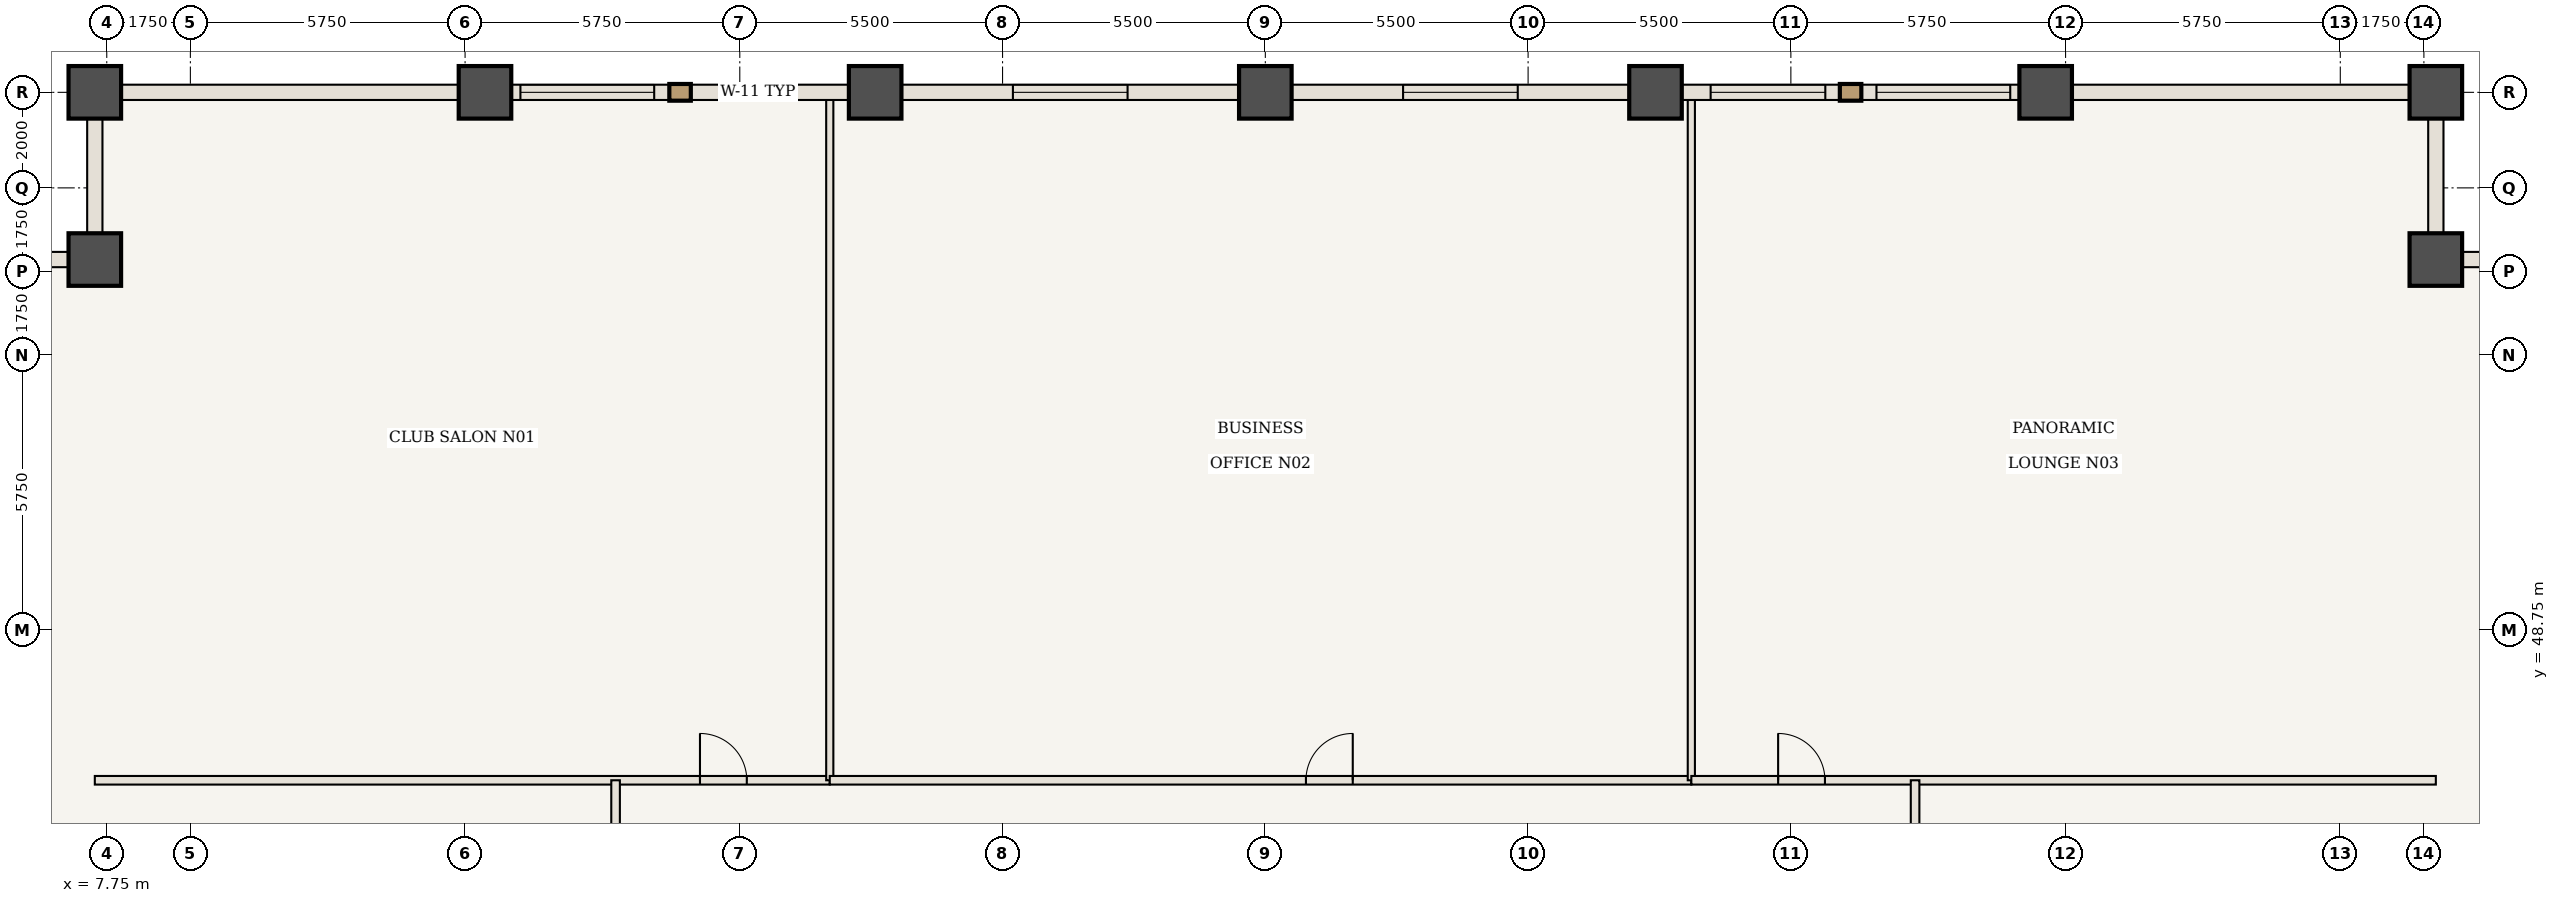
"""IFC4 building model, lengths in metres.
Left out: names, types, materials, properties, quantities, classifications, styles, units other than length and angle.
Written with IfcOpenShell. Run it as: python <this file> out.ifc"""

import sys

from ifc_helpers import new_model, si_unit, direction, frame, frame_2d, origin, origin_2d, place, context, subcontext, project, spatial, rectangle, extrude, element, fill, save


model = new_model("IFC4")
c1 = context("Model", 3, precision=1e-05, world=origin(), true_north=direction((0.0, 1.0)))
c2 = subcontext(c1, "Body", "Model", "MODEL_VIEW")
j1 = project(units=[si_unit("LENGTHUNIT", "METRE"), si_unit("PLANEANGLEUNIT", "RADIAN")], contexts=[c1])
p1 = place(None, origin())
s1 = spatial("IfcSite", under=j1, at=p1, CompositionType="ELEMENT")
p2 = place(p1, origin())
s2 = spatial("IfcBuilding", under=s1, at=p2, CompositionType="ELEMENT")
p3 = place(p2, frame((0.0, 0.0, 96.25)))
s3 = spatial("IfcBuildingStorey", under=s2, at=p3, CompositionType="ELEMENT", Elevation=96.25)
for number, where, z_axis, x_axis in (
    (1, (56.5, 56.5, 0.0), (0.0, 0.0, 1.0), (1.0, 0.0, 0.0)),
    (2, (56.5, 60.0, 0.0), (0.0, 0.0, 1.0), (1.0, 0.0, 0.0)),
    (3, (7.5, 60.0, 0.0), (0.0, 0.0, 1.0), (1.0, 0.0, 0.0)),
    (4, (7.5, 56.5, 0.0), (0.0, 0.0, 1.0), (1.0, 0.0, 0.0)),
    (5, (15.667, 60.0, 0.0), (0.0, 0.0, 1.0), (1.0, 0.0, 0.0)),
    (6, (23.833, 60.0, 0.0), (0.0, 0.0, 1.0), (1.0, 0.0, 0.0)),
    (7, (32.0, 60.0, 0.0), (0.0, 0.0, 1.0), (1.0, 0.0, 0.0)),
    (8, (40.167, 60.0, 0.0), (0.0, 0.0, 1.0), (1.0, 0.0, 0.0)),
    (9, (48.333, 60.0, 0.0), (0.0, 0.0, 1.0), (1.0, 0.0, 0.0)),
):
    element("IfcColumn", number, at=place(p3, frame(where, z_axis=z_axis, x_axis=x_axis)), inside=s3, PredefinedType="COLUMN", context=c2, shape_type="SweptSolid", body=[
        extrude(rectangle(XDim=1.1, YDim=1.1, at=origin_2d()), origin(), (0.0, 0.0, 1.0), 3.5),
    ])
p4 = place(p3, frame((7.5, 45.6, 0.0), z_axis=(0.0, 0.0, 1.0), x_axis=(1.0, 0.0, 0.0)))
e10 = element("IfcWall", 10, at=p4, inside=s3, PredefinedType="STANDARD", context=c2, shape_type="SweptSolid", body=[
    extrude(rectangle(XDim=15.383, YDim=0.18, at=frame_2d((7.692, 0.0))), origin(), (0.0, 0.0, 1.0), 3.08),
])
p5 = place(p4, frame((12.667, 0.0, 0.0)))
e11 = element("IfcOpeningElement", 11, at=p5, cuts=e10, PredefinedType="OPENING", context=c2, shape_type="SweptSolid", body=[
    extrude(rectangle(XDim=0.98, YDim=2.2, at=frame_2d((0.49, 1.1))), frame((0.0, 0.1, 0.0), z_axis=(0.0, -1.0, 0.0), x_axis=(1.0, 0.0, 0.0)), (0.0, 0.0, 1.0), 0.2),
])
p6 = place(p3, frame((22.883, 45.6, 0.0), z_axis=(0.0, 0.0, 1.0), x_axis=(0.0, 1.0, 0.0)))
e12 = element("IfcWall", 12, at=p6, inside=s3, PredefinedType="STANDARD", context=c2, shape_type="SweptSolid", body=[
    extrude(rectangle(XDim=14.34, YDim=0.15, at=frame_2d((7.17, 0.0))), origin(), (0.0, 0.0, 1.0), 3.08),
])
p7 = place(p3, frame((22.883, 45.6, 0.0), z_axis=(0.0, 0.0, 1.0), x_axis=(1.0, 0.0, 0.0)))
e13 = element("IfcWall", 13, at=p7, inside=s3, PredefinedType="STANDARD", context=c2, shape_type="SweptSolid", body=[
    extrude(rectangle(XDim=18.033, YDim=0.18, at=frame_2d((9.017, 0.0))), origin(), (0.0, 0.0, 1.0), 3.08),
])
p8 = place(p7, frame((9.967, 0.0, 0.0)))
e14 = element("IfcOpeningElement", 14, at=p8, cuts=e13, PredefinedType="OPENING", context=c2, shape_type="SweptSolid", body=[
    extrude(rectangle(XDim=0.98, YDim=2.2, at=frame_2d((0.49, 1.1))), frame((0.0, 0.1, 0.0), z_axis=(0.0, -1.0, 0.0), x_axis=(1.0, 0.0, 0.0)), (0.0, 0.0, 1.0), 0.2),
])
p9 = place(p3, frame((40.917, 45.6, 0.0), z_axis=(0.0, 0.0, 1.0), x_axis=(0.0, 1.0, 0.0)))
e15 = element("IfcWall", 15, at=p9, inside=s3, PredefinedType="STANDARD", context=c2, shape_type="SweptSolid", body=[
    extrude(rectangle(XDim=14.34, YDim=0.15, at=frame_2d((7.17, 0.0))), origin(), (0.0, 0.0, 1.0), 3.08),
])
p10 = place(p3, frame((40.917, 45.6, 0.0), z_axis=(0.0, 0.0, 1.0), x_axis=(1.0, 0.0, 0.0)))
e16 = element("IfcWall", 16, at=p10, inside=s3, PredefinedType="STANDARD", context=c2, shape_type="SweptSolid", body=[
    extrude(rectangle(XDim=15.583, YDim=0.18, at=frame_2d((7.792, 0.0))), origin(), (0.0, 0.0, 1.0), 3.08),
])
p11 = place(p10, frame((1.817, 0.0, 0.0)))
e17 = element("IfcOpeningElement", 17, at=p11, cuts=e16, PredefinedType="OPENING", context=c2, shape_type="SweptSolid", body=[
    extrude(rectangle(XDim=0.98, YDim=2.2, at=frame_2d((0.49, 1.1))), frame((0.0, 0.1, 0.0), z_axis=(0.0, -1.0, 0.0), x_axis=(1.0, 0.0, 0.0)), (0.0, 0.0, 1.0), 0.2),
])
p12 = place(p3, frame((18.4, 31.05, 0.0), z_axis=(0.0, 0.0, 1.0), x_axis=(0.0, 1.0, 0.0)))
e18 = element("IfcWall", 18, at=p12, inside=s3, PredefinedType="STANDARD", context=c2, shape_type="SweptSolid", body=[
    extrude(rectangle(XDim=14.55, YDim=0.18, at=frame_2d((7.275, 0.0))), origin(), (0.0, 0.0, 1.0), 3.08),
])
p13 = place(p12, frame((6.775, 0.0, 0.0)))
e19 = element("IfcOpeningElement", 19, at=p13, cuts=e18, PredefinedType="OPENING", context=c2, shape_type="SweptSolid", body=[
    extrude(rectangle(XDim=0.98, YDim=2.2, at=frame_2d((0.49, 1.1))), frame((0.0, 0.1, 0.0), z_axis=(0.0, -1.0, 0.0), x_axis=(1.0, 0.0, 0.0)), (0.0, 0.0, 1.0), 0.2),
])
p14 = place(p3, frame((45.6, 31.05, 0.0), z_axis=(0.0, 0.0, 1.0), x_axis=(0.0, 1.0, 0.0)))
e20 = element("IfcWall", 20, at=p14, inside=s3, PredefinedType="STANDARD", context=c2, shape_type="SweptSolid", body=[
    extrude(rectangle(XDim=14.55, YDim=0.18, at=frame_2d((7.275, 0.0))), origin(), (0.0, 0.0, 1.0), 3.08),
])
p15 = place(p14, frame((6.775, 0.0, 0.0)))
e21 = element("IfcOpeningElement", 21, at=p15, cuts=e20, PredefinedType="OPENING", context=c2, shape_type="SweptSolid", body=[
    extrude(rectangle(XDim=0.98, YDim=2.2, at=frame_2d((0.49, 1.1))), frame((0.0, 0.1, 0.0), z_axis=(0.0, -1.0, 0.0), x_axis=(1.0, 0.0, 0.0)), (0.0, 0.0, 1.0), 0.2),
])
p16 = place(p3, frame((7.5, 60.0, 0.0), z_axis=(0.0, 0.0, 1.0), x_axis=(1.0, 0.0, 0.0)))
e22 = element("IfcWall", 22, at=p16, inside=s3, PredefinedType="USERDEFINED", context=c2, shape_type="SweptSolid", body=[
    extrude(rectangle(XDim=8.167, YDim=0.32, at=frame_2d((4.083, 0.0))), origin(), (0.0, 0.0, 1.0), 2.28),
])
p17 = place(p3, frame((15.667, 60.0, 0.0), z_axis=(0.0, 0.0, 1.0), x_axis=(1.0, 0.0, 0.0)))
e23 = element("IfcWall", 23, at=p17, inside=s3, PredefinedType="USERDEFINED", context=c2, shape_type="SweptSolid", body=[
    extrude(rectangle(XDim=8.167, YDim=0.32, at=frame_2d((4.083, 0.0))), origin(), (0.0, 0.0, 1.0), 2.28),
])
p18 = place(p17, frame((0.742, 0.0, 0.85)))
e24 = element("IfcOpeningElement", 24, at=p18, cuts=e23, PredefinedType="OPENING", context=c2, shape_type="SweptSolid", body=[
    extrude(rectangle(XDim=2.8, YDim=1.23, at=frame_2d((1.4, 0.615))), frame((0.0, 0.17, 0.0), z_axis=(0.0, -1.0, 0.0), x_axis=(1.0, 0.0, 0.0)), (0.0, 0.0, 1.0), 0.34),
])
p19 = place(p17, frame((4.912, 0.0, 0.85)))
e25 = element("IfcOpeningElement", 25, at=p19, cuts=e23, PredefinedType="OPENING", context=c2, shape_type="SweptSolid", body=[
    extrude(rectangle(XDim=1.6, YDim=1.23, at=frame_2d((0.8, 0.615))), frame((0.0, 0.17, 0.0), z_axis=(0.0, -1.0, 0.0), x_axis=(1.0, 0.0, 0.0)), (0.0, 0.0, 1.0), 0.34),
])
p20 = place(p3, frame((23.833, 60.0, 0.0), z_axis=(0.0, 0.0, 1.0), x_axis=(1.0, 0.0, 0.0)))
e26 = element("IfcWall", 26, at=p20, inside=s3, PredefinedType="USERDEFINED", context=c2, shape_type="SweptSolid", body=[
    extrude(rectangle(XDim=8.167, YDim=0.32, at=frame_2d((4.083, 0.0))), origin(), (0.0, 0.0, 1.0), 2.28),
])
p21 = place(p20, frame((2.883, 0.0, 0.85)))
e27 = element("IfcOpeningElement", 27, at=p21, cuts=e26, PredefinedType="OPENING", context=c2, shape_type="SweptSolid", body=[
    extrude(rectangle(XDim=2.4, YDim=1.23, at=frame_2d((1.2, 0.615))), frame((0.0, 0.17, 0.0), z_axis=(0.0, -1.0, 0.0), x_axis=(1.0, 0.0, 0.0)), (0.0, 0.0, 1.0), 0.34),
])
p22 = place(p3, frame((32.0, 60.0, 0.0), z_axis=(0.0, 0.0, 1.0), x_axis=(1.0, 0.0, 0.0)))
e28 = element("IfcWall", 28, at=p22, inside=s3, PredefinedType="USERDEFINED", context=c2, shape_type="SweptSolid", body=[
    extrude(rectangle(XDim=8.167, YDim=0.32, at=frame_2d((4.083, 0.0))), origin(), (0.0, 0.0, 1.0), 2.28),
])
p23 = place(p22, frame((2.883, 0.0, 0.85)))
e29 = element("IfcOpeningElement", 29, at=p23, cuts=e28, PredefinedType="OPENING", context=c2, shape_type="SweptSolid", body=[
    extrude(rectangle(XDim=2.4, YDim=1.23, at=frame_2d((1.2, 0.615))), frame((0.0, 0.17, 0.0), z_axis=(0.0, -1.0, 0.0), x_axis=(1.0, 0.0, 0.0)), (0.0, 0.0, 1.0), 0.34),
])
p24 = place(p3, frame((40.167, 60.0, 0.0), z_axis=(0.0, 0.0, 1.0), x_axis=(1.0, 0.0, 0.0)))
e30 = element("IfcWall", 30, at=p24, inside=s3, PredefinedType="USERDEFINED", context=c2, shape_type="SweptSolid", body=[
    extrude(rectangle(XDim=8.167, YDim=0.32, at=frame_2d((4.083, 0.0))), origin(), (0.0, 0.0, 1.0), 2.28),
])
p25 = place(p24, frame((1.154, 0.0, 0.85)))
e31 = element("IfcOpeningElement", 31, at=p25, cuts=e30, PredefinedType="OPENING", context=c2, shape_type="SweptSolid", body=[
    extrude(rectangle(XDim=2.4, YDim=1.23, at=frame_2d((1.2, 0.615))), frame((0.0, 0.17, 0.0), z_axis=(0.0, -1.0, 0.0), x_axis=(1.0, 0.0, 0.0)), (0.0, 0.0, 1.0), 0.34),
])
p26 = place(p24, frame((4.625, 0.0, 0.85)))
e32 = element("IfcOpeningElement", 32, at=p26, cuts=e30, PredefinedType="OPENING", context=c2, shape_type="SweptSolid", body=[
    extrude(rectangle(XDim=2.8, YDim=1.23, at=frame_2d((1.4, 0.615))), frame((0.0, 0.17, 0.0), z_axis=(0.0, -1.0, 0.0), x_axis=(1.0, 0.0, 0.0)), (0.0, 0.0, 1.0), 0.34),
])
p27 = place(p3, frame((48.333, 60.0, 0.0), z_axis=(0.0, 0.0, 1.0), x_axis=(1.0, 0.0, 0.0)))
e33 = element("IfcWall", 33, at=p27, inside=s3, PredefinedType="USERDEFINED", context=c2, shape_type="SweptSolid", body=[
    extrude(rectangle(XDim=8.167, YDim=0.32, at=frame_2d((4.083, 0.0))), origin(), (0.0, 0.0, 1.0), 2.28),
])
for number, where, z_axis, x_axis in (
    (34, (56.5, 56.5, 0.0), (0.0, 0.0, 1.0), (1.0, 0.0, 0.0)),
    (35, (56.5, 60.0, 0.0), (0.0, 0.0, 1.0), (0.0, -1.0, 0.0)),
    (36, (7.5, 56.5, 0.0), (0.0, 0.0, 1.0), (0.0, 1.0, 0.0)),
    (37, (4.0, 56.5, 0.0), (0.0, 0.0, 1.0), (1.0, 0.0, 0.0)),
):
    element("IfcWall", number, at=place(p3, frame(where, z_axis=z_axis, x_axis=x_axis)), inside=s3, PredefinedType="USERDEFINED", context=c2, shape_type="SweptSolid", body=[
        extrude(rectangle(XDim=3.5, YDim=0.32, at=frame_2d((1.75, 0.0))), origin(), (0.0, 0.0, 1.0), 2.28),
    ])
p28 = place(p5, origin())
e38 = element("IfcDoor", 38, at=p28, inside=s3, OperationType="SINGLE_SWING_LEFT", PredefinedType="DOOR", context=c2, shape_type="SweptSolid", body=[
    extrude(rectangle(XDim=0.98, YDim=2.2, at=frame_2d((0.49, 1.1))), frame((0.0, 0.025, 0.0), z_axis=(0.0, -1.0, 0.0), x_axis=(1.0, 0.0, 0.0)), (0.0, 0.0, 1.0), 0.05),
])
fill(e11, e38)
p29 = place(p8, origin())
e39 = element("IfcDoor", 39, at=p29, inside=s3, OperationType="SINGLE_SWING_RIGHT", PredefinedType="DOOR", context=c2, shape_type="SweptSolid", body=[
    extrude(rectangle(XDim=0.98, YDim=2.2, at=frame_2d((0.49, 1.1))), frame((0.0, 0.025, 0.0), z_axis=(0.0, -1.0, 0.0), x_axis=(1.0, 0.0, 0.0)), (0.0, 0.0, 1.0), 0.05),
])
fill(e14, e39)
p30 = place(p11, origin())
e40 = element("IfcDoor", 40, at=p30, inside=s3, OperationType="SINGLE_SWING_LEFT", PredefinedType="DOOR", context=c2, shape_type="SweptSolid", body=[
    extrude(rectangle(XDim=0.98, YDim=2.2, at=frame_2d((0.49, 1.1))), frame((0.0, 0.025, 0.0), z_axis=(0.0, -1.0, 0.0), x_axis=(1.0, 0.0, 0.0)), (0.0, 0.0, 1.0), 0.05),
])
fill(e17, e40)
p31 = place(p18, origin())
e41 = element("IfcWindow", 41, at=p31, inside=s3, PartitioningType="SINGLE_PANEL", PredefinedType="WINDOW", context=c2, shape_type="SweptSolid", body=[
    extrude(rectangle(XDim=2.8, YDim=1.23, at=frame_2d((1.4, 0.615))), frame((0.0, 0.03, 0.0), z_axis=(0.0, -1.0, 0.0), x_axis=(1.0, 0.0, 0.0)), (0.0, 0.0, 1.0), 0.06),
])
fill(e24, e41)
p32 = place(p19, origin())
e42 = element("IfcWindow", 42, at=p32, inside=s3, PartitioningType="SINGLE_PANEL", PredefinedType="WINDOW", context=c2, shape_type="SweptSolid", body=[
    extrude(rectangle(XDim=1.6, YDim=1.23, at=frame_2d((0.8, 0.615))), frame((0.0, 0.03, 0.0), z_axis=(0.0, -1.0, 0.0), x_axis=(1.0, 0.0, 0.0)), (0.0, 0.0, 1.0), 0.06),
])
fill(e25, e42)
p33 = place(p21, origin())
e43 = element("IfcWindow", 43, at=p33, inside=s3, PartitioningType="SINGLE_PANEL", PredefinedType="WINDOW", context=c2, shape_type="SweptSolid", body=[
    extrude(rectangle(XDim=2.4, YDim=1.23, at=frame_2d((1.2, 0.615))), frame((0.0, 0.03, 0.0), z_axis=(0.0, -1.0, 0.0), x_axis=(1.0, 0.0, 0.0)), (0.0, 0.0, 1.0), 0.06),
])
fill(e27, e43)
p34 = place(p23, origin())
e44 = element("IfcWindow", 44, at=p34, inside=s3, PartitioningType="SINGLE_PANEL", PredefinedType="WINDOW", context=c2, shape_type="SweptSolid", body=[
    extrude(rectangle(XDim=2.4, YDim=1.23, at=frame_2d((1.2, 0.615))), frame((0.0, 0.03, 0.0), z_axis=(0.0, -1.0, 0.0), x_axis=(1.0, 0.0, 0.0)), (0.0, 0.0, 1.0), 0.06),
])
fill(e29, e44)
p35 = place(p25, origin())
e45 = element("IfcWindow", 45, at=p35, inside=s3, PartitioningType="SINGLE_PANEL", PredefinedType="WINDOW", context=c2, shape_type="SweptSolid", body=[
    extrude(rectangle(XDim=2.4, YDim=1.23, at=frame_2d((1.2, 0.615))), frame((0.0, 0.03, 0.0), z_axis=(0.0, -1.0, 0.0), x_axis=(1.0, 0.0, 0.0)), (0.0, 0.0, 1.0), 0.06),
])
fill(e31, e45)
p36 = place(p26, origin())
e46 = element("IfcWindow", 46, at=p36, inside=s3, PartitioningType="SINGLE_PANEL", PredefinedType="WINDOW", context=c2, shape_type="SweptSolid", body=[
    extrude(rectangle(XDim=2.8, YDim=1.23, at=frame_2d((1.4, 0.615))), frame((0.0, 0.03, 0.0), z_axis=(0.0, -1.0, 0.0), x_axis=(1.0, 0.0, 0.0)), (0.0, 0.0, 1.0), 0.06),
])
fill(e32, e46)
save(model, sys.argv[1])
